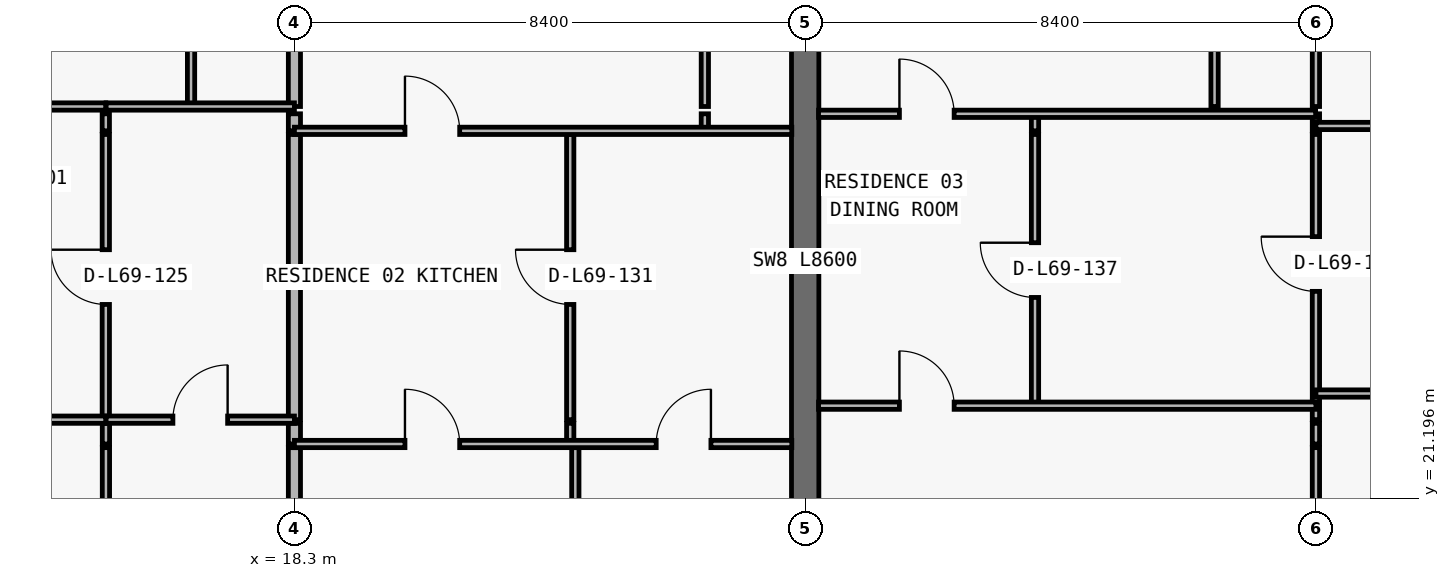
"""IFC4 building model, lengths in metres.
Left out: names, types, materials, properties, quantities, classifications, styles, units other than length and angle.
Written with IfcOpenShell. Run it as: python <this file> out.ifc"""

import sys

from ifc_helpers import new_model, si_unit, direction, frame, frame_2d, origin, place, context, subcontext, project, spatial, rectangle, extrude, element, fill, save


model = new_model("IFC4")
c1 = context("Model", 3, precision=1e-05, world=origin(), true_north=direction((0.0, 1.0)))
c2 = subcontext(c1, "Body", "Model", "MODEL_VIEW")
j1 = project(units=[si_unit("LENGTHUNIT", "METRE"), si_unit("PLANEANGLEUNIT", "RADIAN")], contexts=[c1])
p1 = place(None, origin())
s1 = spatial("IfcSite", under=j1, at=p1, CompositionType="ELEMENT")
p2 = place(p1, origin())
s2 = spatial("IfcBuilding", under=s1, at=p2, CompositionType="ELEMENT")
p3 = place(p2, frame((0.0, 0.0, 246.3)))
s3 = spatial("IfcBuildingStorey", under=s2, at=p3, CompositionType="ELEMENT", Elevation=246.3)
p4 = place(p3, frame((26.7, 20.8, 0.0), z_axis=(0.0, 0.0, 1.0), x_axis=(0.0, 1.0, 0.0)))
e1 = element("IfcWall", 1, at=p4, inside=s3, PredefinedType="SHEAR", context=c2, shape_type="SweptSolid", body=[
    extrude(rectangle(XDim=8.6, YDim=0.45, at=frame_2d((4.3, 0.0))), origin(), (0.0, 0.0, 1.0), 3.05),
])
p5 = place(p3, frame((15.198, 22.49, 0.0), z_axis=(0.0, 0.0, 1.0), x_axis=(0.0, 1.0, 0.0)))
e2 = element("IfcWall", 2, at=p5, inside=s3, PredefinedType="PARTITIONING", context=c2, shape_type="SweptSolid", body=[
    extrude(rectangle(XDim=4.69, YDim=0.12, at=frame_2d((2.345, 0.0))), origin(), (0.0, 0.0, 1.0), 3.05),
])
p6 = place(p5, frame((1.895, 0.0, 0.0)))
e3 = element("IfcOpeningElement", 3, at=p6, cuts=e2, PredefinedType="OPENING", context=c2, shape_type="SweptSolid", body=[
    extrude(rectangle(XDim=0.9, YDim=2.15, at=frame_2d((0.45, 1.075))), frame((0.0, 0.07, 0.0), z_axis=(0.0, -1.0, 0.0), x_axis=(1.0, 0.0, 0.0)), (0.0, 0.0, 1.0), 0.14),
])
p7 = place(p3, frame((15.198, 27.24, 0.0), z_axis=(0.0, 0.0, 1.0), x_axis=(0.0, 1.0, 0.0)))
e4 = element("IfcWall", 4, at=p7, inside=s3, PredefinedType="PARTITIONING", context=c2, shape_type="SweptSolid", body=[
    extrude(rectangle(XDim=0.28, YDim=0.12, at=frame_2d((0.14, 0.0))), origin(), (0.0, 0.0, 1.0), 3.05),
])
p8 = place(p3, frame((15.2, 13.34, 0.0), z_axis=(0.0, 0.0, 1.0), x_axis=(0.0, 1.0, 0.0)))
e5 = element("IfcWall", 5, at=p8, inside=s3, PredefinedType="PARTITIONING", context=c2, shape_type="SweptSolid", body=[
    extrude(rectangle(XDim=8.69, YDim=0.12, at=frame_2d((4.345, 0.0))), origin(), (0.0, 0.0, 1.0), 3.05),
])
p9 = place(p3, frame((15.2, 22.09, 0.0), z_axis=(0.0, 0.0, 1.0), x_axis=(0.0, 1.0, 0.0)))
e6 = element("IfcWall", 6, at=p9, inside=s3, PredefinedType="PARTITIONING", context=c2, shape_type="SweptSolid", body=[
    extrude(rectangle(XDim=0.34, YDim=0.12, at=frame_2d((0.17, 0.0))), origin(), (0.0, 0.0, 1.0), 3.05),
])
p10 = place(p3, frame((16.6, 27.64, 0.0), z_axis=(0.0, 0.0, 1.0), x_axis=(0.0, 1.0, 0.0)))
e7 = element("IfcWall", 7, at=p10, inside=s3, PredefinedType="PARTITIONING", context=c2, shape_type="SweptSolid", body=[
    extrude(rectangle(XDim=6.06, YDim=0.12, at=frame_2d((3.03, 0.0))), origin(), (0.0, 0.0, 1.0), 3.05),
])
p11 = place(p10, frame((2.605, 0.0, 0.0)))
e8 = element("IfcOpeningElement", 8, at=p11, cuts=e7, PredefinedType="OPENING", context=c2, shape_type="SweptSolid", body=[
    extrude(rectangle(XDim=0.85, YDim=2.1, at=frame_2d((0.425, 1.05))), frame((0.0, 0.07, 0.0), z_axis=(0.0, -1.0, 0.0), x_axis=(1.0, 0.0, 0.0)), (0.0, 0.0, 1.0), 0.14),
])
p12 = place(p3, frame((18.3, 13.34, 0.0), z_axis=(0.0, 0.0, 1.0), x_axis=(0.0, 1.0, 0.0)))
e9 = element("IfcWall", 9, at=p12, inside=s3, PredefinedType="PARTITIONING", context=c2, shape_type="SweptSolid", body=[
    extrude(rectangle(XDim=8.69, YDim=0.2, at=frame_2d((4.345, 0.0))), origin(), (0.0, 0.0, 1.0), 2.263),
])
p13 = place(p3, frame((18.3, 22.09, 0.0), z_axis=(0.0, 0.0, 1.0), x_axis=(0.0, 1.0, 0.0)))
e10 = element("IfcWall", 10, at=p13, inside=s3, PredefinedType="PARTITIONING", context=c2, shape_type="SweptSolid", body=[
    extrude(rectangle(XDim=0.34, YDim=0.2, at=frame_2d((0.17, 0.0))), origin(), (0.0, 0.0, 1.0), 2.263),
])
p14 = place(p3, frame((18.3, 22.49, 0.0), z_axis=(0.0, 0.0, 1.0), x_axis=(0.0, 1.0, 0.0)))
e11 = element("IfcWall", 11, at=p14, inside=s3, PredefinedType="PARTITIONING", context=c2, shape_type="SweptSolid", body=[
    extrude(rectangle(XDim=4.69, YDim=0.2, at=frame_2d((2.345, 0.0))), origin(), (0.0, 0.0, 1.0), 2.263),
])
p15 = place(p3, frame((18.3, 27.24, 0.0), z_axis=(0.0, 0.0, 1.0), x_axis=(0.0, 1.0, 0.0)))
e12 = element("IfcWall", 12, at=p15, inside=s3, PredefinedType="PARTITIONING", context=c2, shape_type="SweptSolid", body=[
    extrude(rectangle(XDim=0.28, YDim=0.2, at=frame_2d((0.14, 0.0))), origin(), (0.0, 0.0, 1.0), 2.263),
])
p16 = place(p3, frame((18.3, 27.64, 0.0), z_axis=(0.0, 0.0, 1.0), x_axis=(0.0, 1.0, 0.0)))
e13 = element("IfcWall", 13, at=p16, inside=s3, PredefinedType="PARTITIONING", context=c2, shape_type="SweptSolid", body=[
    extrude(rectangle(XDim=6.06, YDim=0.2, at=frame_2d((3.03, 0.0))), origin(), (0.0, 0.0, 1.0), 2.263),
])
p17 = place(p3, frame((22.836, 22.09, 0.0), z_axis=(0.0, 0.0, 1.0), x_axis=(0.0, 1.0, 0.0)))
e14 = element("IfcWall", 14, at=p17, inside=s3, PredefinedType="PARTITIONING", context=c2, shape_type="SweptSolid", body=[
    extrude(rectangle(XDim=0.34, YDim=0.12, at=frame_2d((0.17, 0.0))), origin(), (0.0, 0.0, 1.0), 3.05),
])
p18 = place(p3, frame((22.836, 22.49, 0.0), z_axis=(0.0, 0.0, 1.0), x_axis=(0.0, 1.0, 0.0)))
e15 = element("IfcWall", 15, at=p18, inside=s3, PredefinedType="PARTITIONING", context=c2, shape_type="SweptSolid", body=[
    extrude(rectangle(XDim=4.69, YDim=0.12, at=frame_2d((2.345, 0.0))), origin(), (0.0, 0.0, 1.0), 3.05),
])
p19 = place(p18, frame((1.895, 0.0, 0.0)))
e16 = element("IfcOpeningElement", 16, at=p19, cuts=e15, PredefinedType="OPENING", context=c2, shape_type="SweptSolid", body=[
    extrude(rectangle(XDim=0.9, YDim=2.15, at=frame_2d((0.45, 1.075))), frame((0.0, 0.07, 0.0), z_axis=(0.0, -1.0, 0.0), x_axis=(1.0, 0.0, 0.0)), (0.0, 0.0, 1.0), 0.14),
])
p20 = place(p3, frame((22.92, 13.34, 0.0), z_axis=(0.0, 0.0, 1.0), x_axis=(0.0, 1.0, 0.0)))
e17 = element("IfcWall", 17, at=p20, inside=s3, PredefinedType="PARTITIONING", context=c2, shape_type="SweptSolid", body=[
    extrude(rectangle(XDim=8.69, YDim=0.12, at=frame_2d((4.345, 0.0))), origin(), (0.0, 0.0, 1.0), 3.05),
])
p21 = place(p3, frame((25.05, 27.24, 0.0), z_axis=(0.0, 0.0, 1.0), x_axis=(0.0, 1.0, 0.0)))
e18 = element("IfcWall", 18, at=p21, inside=s3, PredefinedType="PARTITIONING", context=c2, shape_type="SweptSolid", body=[
    extrude(rectangle(XDim=0.28, YDim=0.12, at=frame_2d((0.14, 0.0))), origin(), (0.0, 0.0, 1.0), 3.05),
])
p22 = place(p3, frame((25.05, 27.64, 0.0), z_axis=(0.0, 0.0, 1.0), x_axis=(0.0, 1.0, 0.0)))
e19 = element("IfcWall", 19, at=p22, inside=s3, PredefinedType="PARTITIONING", context=c2, shape_type="SweptSolid", body=[
    extrude(rectangle(XDim=6.06, YDim=0.12, at=frame_2d((3.03, 0.0))), origin(), (0.0, 0.0, 1.0), 3.05),
])
p23 = place(p22, frame((2.605, 0.0, 0.0)))
e20 = element("IfcOpeningElement", 20, at=p23, cuts=e19, PredefinedType="OPENING", context=c2, shape_type="SweptSolid", body=[
    extrude(rectangle(XDim=0.85, YDim=2.1, at=frame_2d((0.425, 1.05))), frame((0.0, 0.07, 0.0), z_axis=(0.0, -1.0, 0.0), x_axis=(1.0, 0.0, 0.0)), (0.0, 0.0, 1.0), 0.14),
])
p24 = place(p3, frame((30.48, 22.72, 0.0), z_axis=(0.0, 0.0, 1.0), x_axis=(0.0, 1.0, 0.0)))
e21 = element("IfcWall", 21, at=p24, inside=s3, PredefinedType="PARTITIONING", context=c2, shape_type="SweptSolid", body=[
    extrude(rectangle(XDim=4.46, YDim=0.12, at=frame_2d((2.23, 0.0))), origin(), (0.0, 0.0, 1.0), 3.05),
])
p25 = place(p24, frame((1.78, 0.0, 0.0)))
e22 = element("IfcOpeningElement", 22, at=p25, cuts=e21, PredefinedType="OPENING", context=c2, shape_type="SweptSolid", body=[
    extrude(rectangle(XDim=0.9, YDim=2.15, at=frame_2d((0.45, 1.075))), frame((0.0, 0.07, 0.0), z_axis=(0.0, -1.0, 0.0), x_axis=(1.0, 0.0, 0.0)), (0.0, 0.0, 1.0), 0.14),
])
p26 = place(p3, frame((30.48, 27.24, 0.0), z_axis=(0.0, 0.0, 1.0), x_axis=(0.0, 1.0, 0.0)))
e23 = element("IfcWall", 23, at=p26, inside=s3, PredefinedType="PARTITIONING", context=c2, shape_type="SweptSolid", body=[
    extrude(rectangle(XDim=0.28, YDim=0.12, at=frame_2d((0.14, 0.0))), origin(), (0.0, 0.0, 1.0), 3.05),
])
p27 = place(p3, frame((33.433, 27.64, 0.0), z_axis=(0.0, 0.0, 1.0), x_axis=(0.0, 1.0, 0.0)))
e24 = element("IfcWall", 24, at=p27, inside=s3, PredefinedType="PARTITIONING", context=c2, shape_type="SweptSolid", body=[
    extrude(rectangle(XDim=6.06, YDim=0.12, at=frame_2d((3.03, 0.0))), origin(), (0.0, 0.0, 1.0), 3.05),
])
p28 = place(p27, frame((2.605, 0.0, 0.0)))
e25 = element("IfcOpeningElement", 25, at=p28, cuts=e24, PredefinedType="OPENING", context=c2, shape_type="SweptSolid", body=[
    extrude(rectangle(XDim=0.85, YDim=2.1, at=frame_2d((0.425, 1.05))), frame((0.0, 0.07, 0.0), z_axis=(0.0, -1.0, 0.0), x_axis=(1.0, 0.0, 0.0)), (0.0, 0.0, 1.0), 0.14),
])
p29 = place(p3, frame((35.1, 13.34, 0.0), z_axis=(0.0, 0.0, 1.0), x_axis=(0.0, 1.0, 0.0)))
e26 = element("IfcWall", 26, at=p29, inside=s3, PredefinedType="PARTITIONING", context=c2, shape_type="SweptSolid", body=[
    extrude(rectangle(XDim=8.69, YDim=0.12, at=frame_2d((4.345, 0.0))), origin(), (0.0, 0.0, 1.0), 2.263),
])
p30 = place(p3, frame((35.1, 22.09, 0.0), z_axis=(0.0, 0.0, 1.0), x_axis=(0.0, 1.0, 0.0)))
e27 = element("IfcWall", 27, at=p30, inside=s3, PredefinedType="PARTITIONING", context=c2, shape_type="SweptSolid", body=[
    extrude(rectangle(XDim=0.34, YDim=0.12, at=frame_2d((0.17, 0.0))), origin(), (0.0, 0.0, 1.0), 2.263),
])
p31 = place(p3, frame((35.1, 22.49, 0.0), z_axis=(0.0, 0.0, 1.0), x_axis=(0.0, 1.0, 0.0)))
e28 = element("IfcWall", 28, at=p31, inside=s3, PredefinedType="PARTITIONING", context=c2, shape_type="SweptSolid", body=[
    extrude(rectangle(XDim=4.69, YDim=0.12, at=frame_2d((2.345, 0.0))), origin(), (0.0, 0.0, 1.0), 2.263),
])
p32 = place(p31, frame((2.11, 0.0, 0.0)))
e29 = element("IfcOpeningElement", 29, at=p32, cuts=e28, PredefinedType="OPENING", context=c2, shape_type="SweptSolid", body=[
    extrude(rectangle(XDim=0.9, YDim=2.15, at=frame_2d((0.45, 1.075))), frame((0.0, 0.07, 0.0), z_axis=(0.0, -1.0, 0.0), x_axis=(1.0, 0.0, 0.0)), (0.0, 0.0, 1.0), 0.14),
])
p33 = place(p3, frame((35.1, 27.24, 0.0), z_axis=(0.0, 0.0, 1.0), x_axis=(0.0, 1.0, 0.0)))
e30 = element("IfcWall", 30, at=p33, inside=s3, PredefinedType="PARTITIONING", context=c2, shape_type="SweptSolid", body=[
    extrude(rectangle(XDim=0.28, YDim=0.12, at=frame_2d((0.14, 0.0))), origin(), (0.0, 0.0, 1.0), 2.263),
])
p34 = place(p3, frame((35.1, 27.64, 0.0), z_axis=(0.0, 0.0, 1.0), x_axis=(0.0, 1.0, 0.0)))
e31 = element("IfcWall", 31, at=p34, inside=s3, PredefinedType="PARTITIONING", context=c2, shape_type="SweptSolid", body=[
    extrude(rectangle(XDim=6.06, YDim=0.12, at=frame_2d((3.03, 0.0))), origin(), (0.0, 0.0, 1.0), 2.263),
])
p35 = place(p3, frame((18.3, 22.09, 0.0), z_axis=(0.0, 0.0, 1.0), x_axis=(1.0, 0.0, 0.0)))
e32 = element("IfcWall", 32, at=p35, inside=s3, PredefinedType="PARTITIONING", context=c2, shape_type="SweptSolid", body=[
    extrude(rectangle(XDim=8.18, YDim=0.12, at=frame_2d((4.09, 0.0))), origin(), (0.0, 0.0, 1.0), 3.05),
])
p36 = place(p35, frame((1.818, 0.0, 0.0)))
e33 = element("IfcOpeningElement", 33, at=p36, cuts=e32, PredefinedType="OPENING", context=c2, shape_type="SweptSolid", body=[
    extrude(rectangle(XDim=0.9, YDim=2.15, at=frame_2d((0.45, 1.075))), frame((0.0, 0.07, 0.0), z_axis=(0.0, -1.0, 0.0), x_axis=(1.0, 0.0, 0.0)), (0.0, 0.0, 1.0), 0.14),
])
p37 = place(p35, frame((5.95, 0.0, 0.0)))
e34 = element("IfcOpeningElement", 34, at=p37, cuts=e32, PredefinedType="OPENING", context=c2, shape_type="SweptSolid", body=[
    extrude(rectangle(XDim=0.9, YDim=2.15, at=frame_2d((0.45, 1.075))), frame((0.0, 0.07, 0.0), z_axis=(0.0, -1.0, 0.0), x_axis=(1.0, 0.0, 0.0)), (0.0, 0.0, 1.0), 0.14),
])
p38 = place(p3, frame((12.1, 22.49, 0.0), z_axis=(0.0, 0.0, 1.0), x_axis=(1.0, 0.0, 0.0)))
e35 = element("IfcWall", 35, at=p38, inside=s3, PredefinedType="PARTITIONING", context=c2, shape_type="SweptSolid", body=[
    extrude(rectangle(XDim=3.098, YDim=0.12, at=frame_2d((1.549, 0.0))), origin(), (0.0, 0.0, 1.0), 3.05),
])
p39 = place(p38, frame((1.099, 0.0, 0.0)))
e36 = element("IfcOpeningElement", 36, at=p39, cuts=e35, PredefinedType="OPENING", context=c2, shape_type="SweptSolid", body=[
    extrude(rectangle(XDim=0.9, YDim=2.15, at=frame_2d((0.45, 1.075))), frame((0.0, 0.07, 0.0), z_axis=(0.0, -1.0, 0.0), x_axis=(1.0, 0.0, 0.0)), (0.0, 0.0, 1.0), 0.14),
])
p40 = place(p3, frame((15.203, 22.49, 0.0), z_axis=(0.0, 0.0, 1.0), x_axis=(1.0, 0.0, 0.0)))
e37 = element("IfcWall", 37, at=p40, inside=s3, PredefinedType="PARTITIONING", context=c2, shape_type="SweptSolid", body=[
    extrude(rectangle(XDim=3.097, YDim=0.12, at=frame_2d((1.549, 0.0))), origin(), (0.0, 0.0, 1.0), 3.05),
])
p41 = place(p40, frame((1.098, 0.0, 0.0)))
e38 = element("IfcOpeningElement", 38, at=p41, cuts=e37, PredefinedType="OPENING", context=c2, shape_type="SweptSolid", body=[
    extrude(rectangle(XDim=0.9, YDim=2.15, at=frame_2d((0.45, 1.075))), frame((0.0, 0.07, 0.0), z_axis=(0.0, -1.0, 0.0), x_axis=(1.0, 0.0, 0.0)), (0.0, 0.0, 1.0), 0.14),
])
p42 = place(p3, frame((26.92, 22.72, 0.0), z_axis=(0.0, 0.0, 1.0), x_axis=(1.0, 0.0, 0.0)))
e39 = element("IfcWall", 39, at=p42, inside=s3, PredefinedType="PARTITIONING", context=c2, shape_type="SweptSolid", body=[
    extrude(rectangle(XDim=8.18, YDim=0.12, at=frame_2d((4.09, 0.0))), origin(), (0.0, 0.0, 1.0), 3.05),
])
p43 = place(p42, frame((1.33, 0.0, 0.0)))
e40 = element("IfcOpeningElement", 40, at=p43, cuts=e39, PredefinedType="OPENING", context=c2, shape_type="SweptSolid", body=[
    extrude(rectangle(XDim=0.9, YDim=2.15, at=frame_2d((0.45, 1.075))), frame((0.0, 0.07, 0.0), z_axis=(0.0, -1.0, 0.0), x_axis=(1.0, 0.0, 0.0)), (0.0, 0.0, 1.0), 0.14),
])
p44 = place(p3, frame((35.1, 22.92, 0.0), z_axis=(0.0, 0.0, 1.0), x_axis=(1.0, 0.0, 0.0)))
e41 = element("IfcWall", 41, at=p44, inside=s3, PredefinedType="PARTITIONING", context=c2, shape_type="SweptSolid", body=[
    extrude(rectangle(XDim=6.095, YDim=0.12, at=frame_2d((3.047, 0.0))), origin(), (0.0, 0.0, 1.0), 3.05),
])
p45 = place(p44, frame((2.597, 0.0, 0.0)))
e42 = element("IfcOpeningElement", 42, at=p45, cuts=e41, PredefinedType="OPENING", context=c2, shape_type="SweptSolid", body=[
    extrude(rectangle(XDim=0.9, YDim=2.15, at=frame_2d((0.45, 1.075))), frame((0.0, 0.07, 0.0), z_axis=(0.0, -1.0, 0.0), x_axis=(1.0, 0.0, 0.0)), (0.0, 0.0, 1.0), 0.14),
])
p46 = place(p3, frame((18.3, 27.24, 0.0), z_axis=(0.0, 0.0, 1.0), x_axis=(1.0, 0.0, 0.0)))
e43 = element("IfcWall", 43, at=p46, inside=s3, PredefinedType="PARTITIONING", context=c2, shape_type="SweptSolid", body=[
    extrude(rectangle(XDim=8.18, YDim=0.12, at=frame_2d((4.09, 0.0))), origin(), (0.0, 0.0, 1.0), 3.05),
])
p47 = place(p46, frame((1.818, 0.0, 0.0)))
e44 = element("IfcOpeningElement", 44, at=p47, cuts=e43, PredefinedType="OPENING", context=c2, shape_type="SweptSolid", body=[
    extrude(rectangle(XDim=0.9, YDim=2.15, at=frame_2d((0.45, 1.075))), frame((0.0, 0.07, 0.0), z_axis=(0.0, -1.0, 0.0), x_axis=(1.0, 0.0, 0.0)), (0.0, 0.0, 1.0), 0.14),
])
p48 = place(p3, frame((35.1, 27.32, 0.0), z_axis=(0.0, 0.0, 1.0), x_axis=(1.0, 0.0, 0.0)))
e45 = element("IfcWall", 45, at=p48, inside=s3, PredefinedType="PARTITIONING", context=c2, shape_type="SweptSolid", body=[
    extrude(rectangle(XDim=6.095, YDim=0.12, at=frame_2d((3.047, 0.0))), origin(), (0.0, 0.0, 1.0), 3.05),
])
p49 = place(p48, frame((2.597, 0.0, 0.0)))
e46 = element("IfcOpeningElement", 46, at=p49, cuts=e45, PredefinedType="OPENING", context=c2, shape_type="SweptSolid", body=[
    extrude(rectangle(XDim=0.9, YDim=2.15, at=frame_2d((0.45, 1.075))), frame((0.0, 0.07, 0.0), z_axis=(0.0, -1.0, 0.0), x_axis=(1.0, 0.0, 0.0)), (0.0, 0.0, 1.0), 0.14),
])
p50 = place(p3, frame((26.92, 27.52, 0.0), z_axis=(0.0, 0.0, 1.0), x_axis=(1.0, 0.0, 0.0)))
e47 = element("IfcWall", 47, at=p50, inside=s3, PredefinedType="PARTITIONING", context=c2, shape_type="SweptSolid", body=[
    extrude(rectangle(XDim=8.175, YDim=0.12, at=frame_2d((4.087, 0.0))), origin(), (0.0, 0.0, 1.0), 3.05),
])
p51 = place(p50, frame((1.33, 0.0, 0.0)))
e48 = element("IfcOpeningElement", 48, at=p51, cuts=e47, PredefinedType="OPENING", context=c2, shape_type="SweptSolid", body=[
    extrude(rectangle(XDim=0.9, YDim=2.15, at=frame_2d((0.45, 1.075))), frame((0.0, 0.07, 0.0), z_axis=(0.0, -1.0, 0.0), x_axis=(1.0, 0.0, 0.0)), (0.0, 0.0, 1.0), 0.14),
])
p52 = place(p3, frame((12.1, 27.64, 0.0), z_axis=(0.0, 0.0, 1.0), x_axis=(1.0, 0.0, 0.0)))
e49 = element("IfcWall", 49, at=p52, inside=s3, PredefinedType="PARTITIONING", context=c2, shape_type="SweptSolid", body=[
    extrude(rectangle(XDim=3.098, YDim=0.12, at=frame_2d((1.549, 0.0))), origin(), (0.0, 0.0, 1.0), 3.05),
])
p53 = place(p52, frame((1.099, 0.0, 0.0)))
e50 = element("IfcOpeningElement", 50, at=p53, cuts=e49, PredefinedType="OPENING", context=c2, shape_type="SweptSolid", body=[
    extrude(rectangle(XDim=0.9, YDim=2.15, at=frame_2d((0.45, 1.075))), frame((0.0, 0.07, 0.0), z_axis=(0.0, -1.0, 0.0), x_axis=(1.0, 0.0, 0.0)), (0.0, 0.0, 1.0), 0.14),
])
p54 = place(p3, frame((15.203, 27.64, 0.0), z_axis=(0.0, 0.0, 1.0), x_axis=(1.0, 0.0, 0.0)))
e51 = element("IfcWall", 51, at=p54, inside=s3, PredefinedType="PARTITIONING", context=c2, shape_type="SweptSolid", body=[
    extrude(rectangle(XDim=3.097, YDim=0.12, at=frame_2d((1.549, 0.0))), origin(), (0.0, 0.0, 1.0), 3.05),
])
p55 = place(p6, origin())
e52 = element("IfcDoor", 52, at=p55, inside=s3, OperationType="SINGLE_SWING_RIGHT", PredefinedType="DOOR", context=c2, shape_type="SweptSolid", body=[
    extrude(rectangle(XDim=0.9, YDim=2.15, at=frame_2d((0.45, 1.075))), frame((0.0, 0.025, 0.0), z_axis=(0.0, -1.0, 0.0), x_axis=(1.0, 0.0, 0.0)), (0.0, 0.0, 1.0), 0.05),
])
fill(e3, e52)
p56 = place(p41, origin())
e53 = element("IfcDoor", 53, at=p56, inside=s3, OperationType="SINGLE_SWING_RIGHT", PredefinedType="DOOR", context=c2, shape_type="SweptSolid", body=[
    extrude(rectangle(XDim=0.9, YDim=2.15, at=frame_2d((0.45, 1.075))), frame((0.0, 0.025, 0.0), z_axis=(0.0, -1.0, 0.0), x_axis=(1.0, 0.0, 0.0)), (0.0, 0.0, 1.0), 0.05),
])
fill(e38, e53)
p57 = place(p47, origin())
e54 = element("IfcDoor", 54, at=p57, inside=s3, OperationType="SINGLE_SWING_LEFT", PredefinedType="DOOR", context=c2, shape_type="SweptSolid", body=[
    extrude(rectangle(XDim=0.9, YDim=2.15, at=frame_2d((0.45, 1.075))), frame((0.0, 0.025, 0.0), z_axis=(0.0, -1.0, 0.0), x_axis=(1.0, 0.0, 0.0)), (0.0, 0.0, 1.0), 0.05),
])
fill(e44, e54)
p58 = place(p19, origin())
e55 = element("IfcDoor", 55, at=p58, inside=s3, OperationType="SINGLE_SWING_RIGHT", PredefinedType="DOOR", context=c2, shape_type="SweptSolid", body=[
    extrude(rectangle(XDim=0.9, YDim=2.15, at=frame_2d((0.45, 1.075))), frame((0.0, 0.025, 0.0), z_axis=(0.0, -1.0, 0.0), x_axis=(1.0, 0.0, 0.0)), (0.0, 0.0, 1.0), 0.05),
])
fill(e16, e55)
p59 = place(p36, origin())
e56 = element("IfcDoor", 56, at=p59, inside=s3, OperationType="SINGLE_SWING_LEFT", PredefinedType="DOOR", context=c2, shape_type="SweptSolid", body=[
    extrude(rectangle(XDim=0.9, YDim=2.15, at=frame_2d((0.45, 1.075))), frame((0.0, 0.025, 0.0), z_axis=(0.0, -1.0, 0.0), x_axis=(1.0, 0.0, 0.0)), (0.0, 0.0, 1.0), 0.05),
])
fill(e33, e56)
p60 = place(p37, origin())
e57 = element("IfcDoor", 57, at=p60, inside=s3, OperationType="SINGLE_SWING_RIGHT", PredefinedType="DOOR", context=c2, shape_type="SweptSolid", body=[
    extrude(rectangle(XDim=0.9, YDim=2.15, at=frame_2d((0.45, 1.075))), frame((0.0, 0.025, 0.0), z_axis=(0.0, -1.0, 0.0), x_axis=(1.0, 0.0, 0.0)), (0.0, 0.0, 1.0), 0.05),
])
fill(e34, e57)
p61 = place(p51, origin())
e58 = element("IfcDoor", 58, at=p61, inside=s3, OperationType="SINGLE_SWING_LEFT", PredefinedType="DOOR", context=c2, shape_type="SweptSolid", body=[
    extrude(rectangle(XDim=0.9, YDim=2.15, at=frame_2d((0.45, 1.075))), frame((0.0, 0.025, 0.0), z_axis=(0.0, -1.0, 0.0), x_axis=(1.0, 0.0, 0.0)), (0.0, 0.0, 1.0), 0.05),
])
fill(e48, e58)
p62 = place(p25, origin())
e59 = element("IfcDoor", 59, at=p62, inside=s3, OperationType="SINGLE_SWING_RIGHT", PredefinedType="DOOR", context=c2, shape_type="SweptSolid", body=[
    extrude(rectangle(XDim=0.9, YDim=2.15, at=frame_2d((0.45, 1.075))), frame((0.0, 0.025, 0.0), z_axis=(0.0, -1.0, 0.0), x_axis=(1.0, 0.0, 0.0)), (0.0, 0.0, 1.0), 0.05),
])
fill(e22, e59)
p63 = place(p43, origin())
e60 = element("IfcDoor", 60, at=p63, inside=s3, OperationType="SINGLE_SWING_LEFT", PredefinedType="DOOR", context=c2, shape_type="SweptSolid", body=[
    extrude(rectangle(XDim=0.9, YDim=2.15, at=frame_2d((0.45, 1.075))), frame((0.0, 0.025, 0.0), z_axis=(0.0, -1.0, 0.0), x_axis=(1.0, 0.0, 0.0)), (0.0, 0.0, 1.0), 0.05),
])
fill(e40, e60)
p64 = place(p32, origin())
e61 = element("IfcDoor", 61, at=p64, inside=s3, OperationType="SINGLE_SWING_RIGHT", PredefinedType="DOOR", context=c2, shape_type="SweptSolid", body=[
    extrude(rectangle(XDim=0.9, YDim=2.15, at=frame_2d((0.45, 1.075))), frame((0.0, 0.025, 0.0), z_axis=(0.0, -1.0, 0.0), x_axis=(1.0, 0.0, 0.0)), (0.0, 0.0, 1.0), 0.05),
])
fill(e29, e61)
save(model, sys.argv[1])
